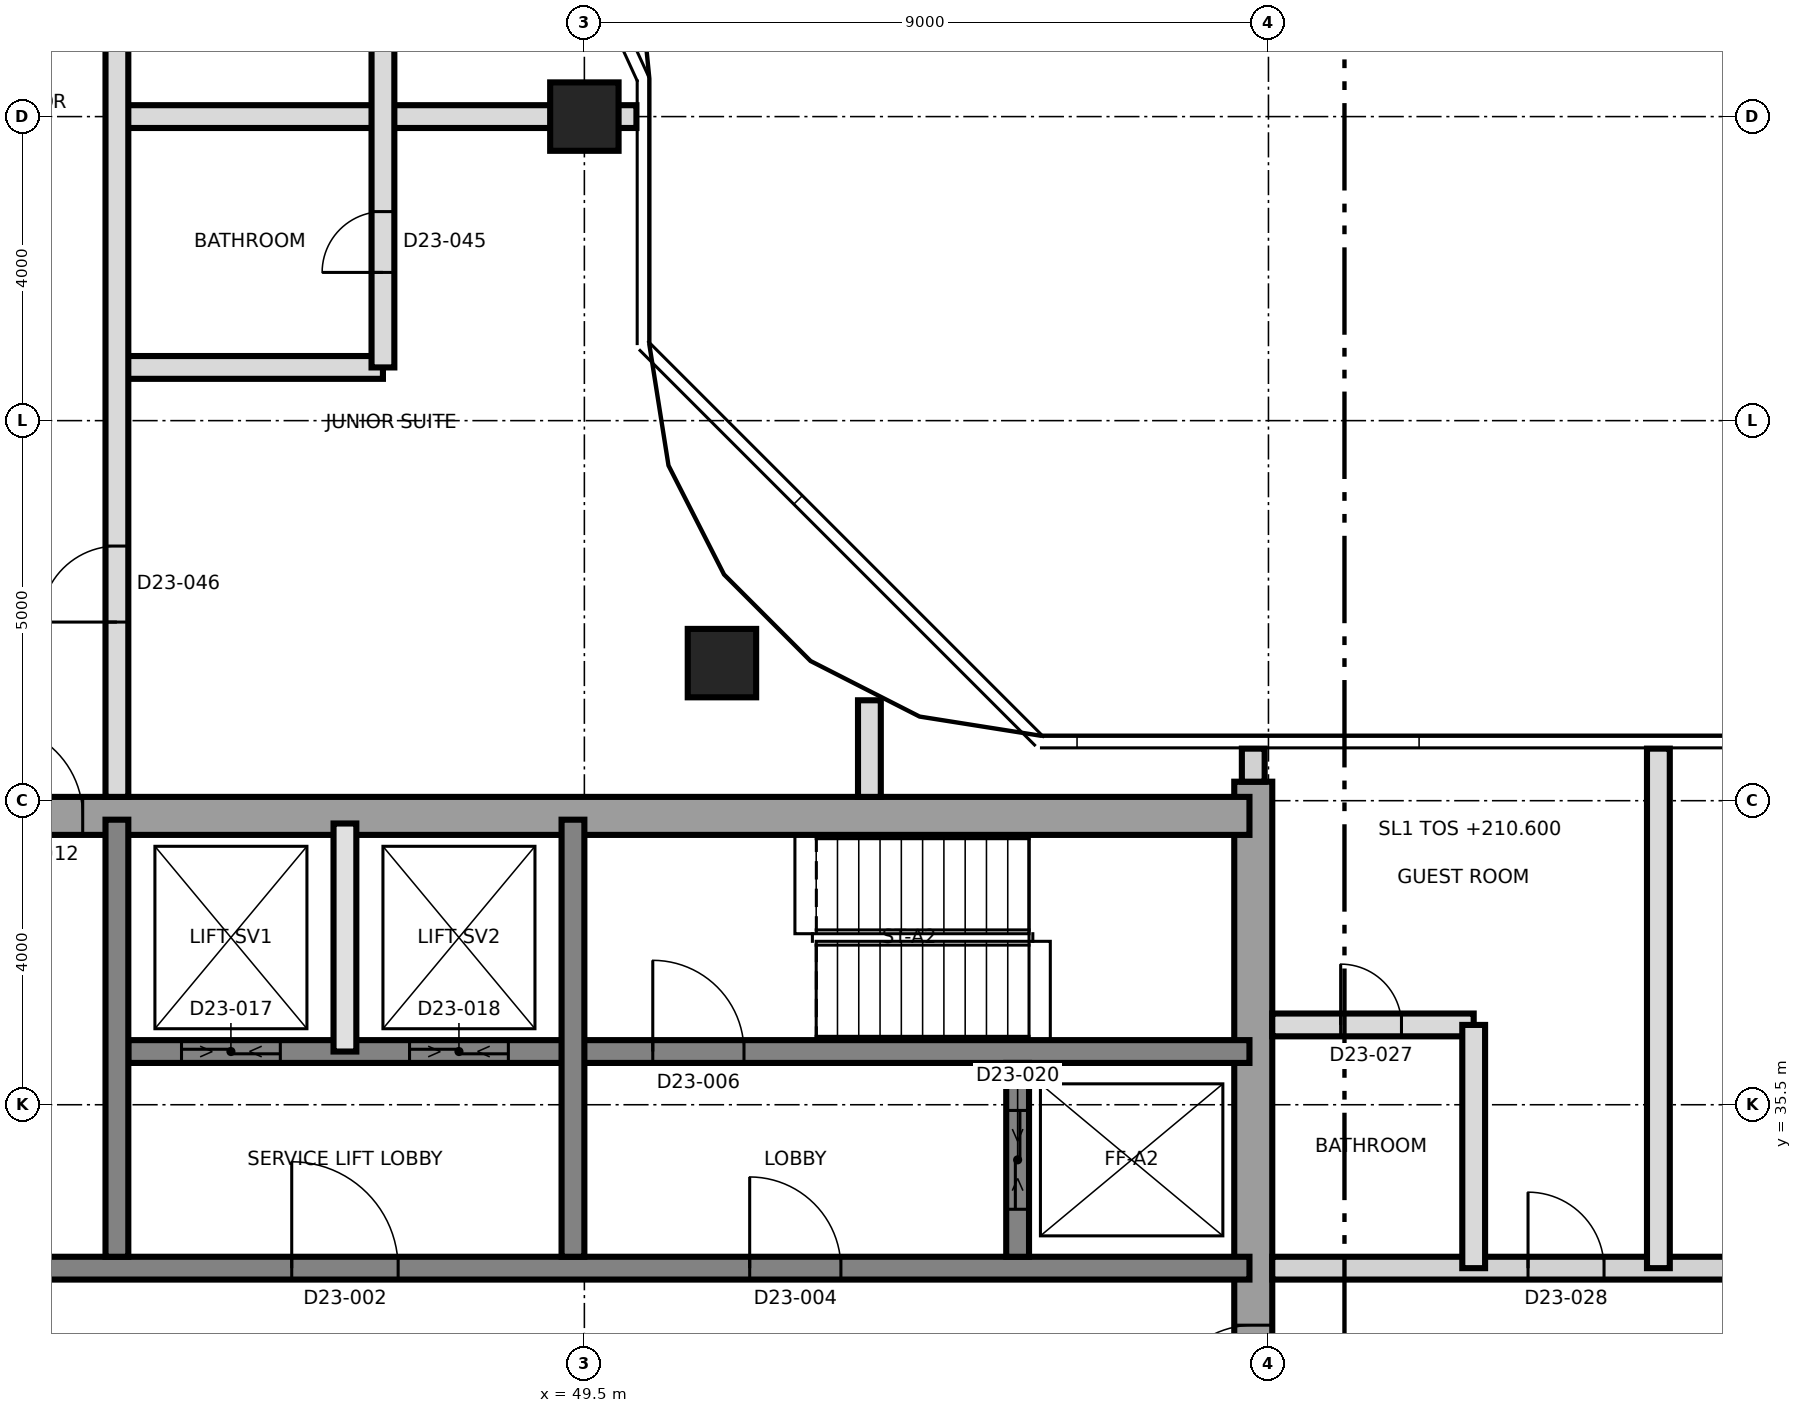
"""IFC4 building model, lengths in metres.
Left out: names, types, materials, properties, quantities, classifications, styles, units other than length and angle.
Written with IfcOpenShell. Run it as: python <this file> out.ifc"""

import sys

from ifc_helpers import new_model, si_unit, direction, frame, frame_2d, origin, origin_2d, place, context, subcontext, project, spatial, rectangle, extrude, element, fill, save


model = new_model("IFC4")
c1 = context("Model", 3, precision=1e-05, world=origin(), true_north=direction((0.0, 1.0)))
c2 = subcontext(c1, "Body", "Model", "MODEL_VIEW")
j1 = project(units=[si_unit("LENGTHUNIT", "METRE"), si_unit("PLANEANGLEUNIT", "RADIAN")], contexts=[c1])
p1 = place(None, origin())
s1 = spatial("IfcSite", under=j1, at=p1, CompositionType="ELEMENT")
p2 = place(p1, origin())
s2 = spatial("IfcBuilding", under=s1, at=p2, CompositionType="ELEMENT")
p3 = place(p2, frame((0.0, 0.0, 210.6)))
s3 = spatial("IfcBuildingStorey", under=s2, at=p3, CompositionType="ELEMENT", Elevation=210.6)
p4 = place(p3, frame((58.3, 21.25, 0.0), z_axis=(0.0, 0.0, 1.0), x_axis=(0.0, 1.0, 0.0)))
e1 = element("IfcWall", 1, at=p4, inside=s3, PredefinedType="SHEAR", context=c2, shape_type="SweptSolid", body=[
    extrude(rectangle(XDim=18.5, YDim=0.5, at=frame_2d((9.25, 0.0))), origin(), (0.0, 0.0, 1.0), 3.7),
])
p5 = place(p4, frame((10.15, 0.0, 0.0)))
e2 = element("IfcOpeningElement", 2, at=p5, cuts=e1, PredefinedType="OPENING", context=c2, shape_type="SweptSolid", body=[
    extrude(rectangle(XDim=1.2, YDim=2.1, at=frame_2d((0.6, 1.05))), frame((0.0, 0.26, 0.0), z_axis=(0.0, -1.0, 0.0), x_axis=(1.0, 0.0, 0.0)), (0.0, 0.0, 1.0), 0.52),
])
p6 = place(p3, frame((31.25, 39.3, 0.0), z_axis=(0.0, 0.0, 1.0), x_axis=(1.0, 0.0, 0.0)))
e3 = element("IfcWall", 3, at=p6, inside=s3, PredefinedType="SHEAR", context=c2, shape_type="SweptSolid", body=[
    extrude(rectangle(XDim=27.0, YDim=0.5, at=frame_2d((13.5, 0.0))), origin(), (0.0, 0.0, 1.0), 3.7),
])
p7 = place(p6, frame((10.45, 0.0, 0.0)))
e4 = element("IfcOpeningElement", 4, at=p7, cuts=e3, PredefinedType="OPENING", context=c2, shape_type="SweptSolid", body=[
    extrude(rectangle(XDim=1.2, YDim=2.1, at=frame_2d((0.6, 1.05))), frame((0.0, 0.26, 0.0), z_axis=(0.0, -1.0, 0.0), x_axis=(1.0, 0.0, 0.0)), (0.0, 0.0, 1.0), 0.52),
])
p8 = place(p3, frame((31.75, 33.35, 0.0), z_axis=(0.0, 0.0, 1.0), x_axis=(1.0, 0.0, 0.0)))
e5 = element("IfcWall", 5, at=p8, inside=s3, PredefinedType="SHEAR", context=c2, shape_type="SweptSolid", body=[
    extrude(rectangle(XDim=26.5, YDim=0.3, at=frame_2d((13.25, 0.0))), origin(), (0.0, 0.0, 1.0), 3.7),
])
p9 = place(p8, frame((13.9, 0.0, 0.0)))
e6 = element("IfcOpeningElement", 6, at=p9, cuts=e5, PredefinedType="OPENING", context=c2, shape_type="SweptSolid", body=[
    extrude(rectangle(XDim=1.4, YDim=2.1, at=frame_2d((0.7, 1.05))), frame((0.0, 0.16, 0.0), z_axis=(0.0, -1.0, 0.0), x_axis=(1.0, 0.0, 0.0)), (0.0, 0.0, 1.0), 0.32),
])
p10 = place(p8, frame((5.375, 0.0, 0.0)))
e7 = element("IfcOpeningElement", 7, at=p10, cuts=e5, PredefinedType="OPENING", context=c2, shape_type="SweptSolid", body=[
    extrude(rectangle(XDim=1.2, YDim=2.1, at=frame_2d((0.6, 1.05))), frame((0.0, 0.16, 0.0), z_axis=(0.0, -1.0, 0.0), x_axis=(1.0, 0.0, 0.0)), (0.0, 0.0, 1.0), 0.32),
])
p11 = place(p8, frame((19.925, 0.0, 0.0)))
e8 = element("IfcOpeningElement", 8, at=p11, cuts=e5, PredefinedType="OPENING", context=c2, shape_type="SweptSolid", body=[
    extrude(rectangle(XDim=1.2, YDim=2.1, at=frame_2d((0.6, 1.05))), frame((0.0, 0.16, 0.0), z_axis=(0.0, -1.0, 0.0), x_axis=(1.0, 0.0, 0.0)), (0.0, 0.0, 1.0), 0.32),
])
p12 = place(p3, frame((43.5, 36.2, 0.0), z_axis=(0.0, 0.0, 1.0), x_axis=(1.0, 0.0, 0.0)))
e9 = element("IfcWall", 9, at=p12, inside=s3, PredefinedType="SHEAR", context=c2, shape_type="SweptSolid", body=[
    extrude(rectangle(XDim=14.75, YDim=0.3, at=frame_2d((7.375, 0.0))), origin(), (0.0, 0.0, 1.0), 3.7),
])
p13 = place(p12, frame((6.9, 0.0, 0.0)))
e10 = element("IfcOpeningElement", 10, at=p13, cuts=e9, PredefinedType="OPENING", context=c2, shape_type="SweptSolid", body=[
    extrude(rectangle(XDim=1.2, YDim=2.1, at=frame_2d((0.6, 1.05))), frame((0.0, 0.16, 0.0), z_axis=(0.0, -1.0, 0.0), x_axis=(1.0, 0.0, 0.0)), (0.0, 0.0, 1.0), 0.32),
])
p14 = place(p12, frame((0.7, 0.0, 0.0)))
e11 = element("IfcOpeningElement", 11, at=p14, cuts=e9, PredefinedType="OPENING", context=c2, shape_type="SweptSolid", body=[
    extrude(rectangle(XDim=1.3, YDim=2.4, at=frame_2d((0.65, 1.2))), frame((0.0, 0.16, 0.0), z_axis=(0.0, -1.0, 0.0), x_axis=(1.0, 0.0, 0.0)), (0.0, 0.0, 1.0), 0.32),
])
p15 = place(p12, frame((3.7, 0.0, 0.0)))
e12 = element("IfcOpeningElement", 12, at=p15, cuts=e9, PredefinedType="OPENING", context=c2, shape_type="SweptSolid", body=[
    extrude(rectangle(XDim=1.3, YDim=2.4, at=frame_2d((0.65, 1.2))), frame((0.0, 0.16, 0.0), z_axis=(0.0, -1.0, 0.0), x_axis=(1.0, 0.0, 0.0)), (0.0, 0.0, 1.0), 0.32),
])
for number, where, z_axis, x_axis in (
    (13, (43.35, 33.5, 0.0), (0.0, 0.0, 1.0), (0.0, 1.0, 0.0)),
    (14, (49.35, 33.5, 0.0), (0.0, 0.0, 1.0), (0.0, 1.0, 0.0)),
):
    element("IfcWall", number, at=place(p3, frame(where, z_axis=z_axis, x_axis=x_axis)), inside=s3, PredefinedType="SHEAR", context=c2, shape_type="SweptSolid", body=[
        extrude(rectangle(XDim=5.75, YDim=0.3, at=frame_2d((2.875, 0.0))), origin(), (0.0, 0.0, 1.0), 3.7),
    ])
p16 = place(p3, frame((55.2, 33.5, 0.0), z_axis=(0.0, 0.0, 1.0), x_axis=(0.0, 1.0, 0.0)))
e15 = element("IfcWall", 15, at=p16, inside=s3, PredefinedType="SHEAR", context=c2, shape_type="SweptSolid", body=[
    extrude(rectangle(XDim=2.55, YDim=0.3, at=frame_2d((1.275, 0.0))), origin(), (0.0, 0.0, 1.0), 3.7),
])
p17 = place(p16, frame((0.625, 0.0, 0.0)))
e16 = element("IfcOpeningElement", 16, at=p17, cuts=e15, PredefinedType="OPENING", context=c2, shape_type="SweptSolid", body=[
    extrude(rectangle(XDim=1.3, YDim=2.4, at=frame_2d((0.65, 1.2))), frame((0.0, 0.16, 0.0), z_axis=(0.0, -1.0, 0.0), x_axis=(1.0, 0.0, 0.0)), (0.0, 0.0, 1.0), 0.32),
])
for number, where, z_axis, x_axis in (
    (17, (51.31, 41.31, 0.0), (0.0, 0.0, 1.0), (1.0, 0.0, 0.0)),
    (18, (49.5, 48.5, 0.0), (0.0, 0.0, 1.0), (1.0, 0.0, 0.0)),
):
    element("IfcColumn", number, at=place(p3, frame(where, z_axis=z_axis, x_axis=x_axis)), inside=s3, PredefinedType="COLUMN", context=c2, shape_type="SweptSolid", body=[
        extrude(rectangle(XDim=0.9, YDim=0.9, at=origin_2d()), origin(), (0.0, 0.0, 1.0), 3.7),
    ])
p18 = place(p3, frame((46.35, 36.2, 0.0), z_axis=(0.0, 0.0, 1.0), x_axis=(0.0, 1.0, 0.0)))
e19 = element("IfcWall", 19, at=p18, inside=s3, PredefinedType="SOLIDWALL", context=c2, shape_type="SweptSolid", body=[
    extrude(rectangle(XDim=3.0, YDim=0.3, at=frame_2d((1.5, 0.0))), origin(), (0.0, 0.0, 1.0), 3.4),
])
p19 = place(p3, frame((58.55, 33.35, 0.0), z_axis=(0.0, 0.0, 1.0), x_axis=(1.0, 0.0, 0.0)))
e20 = element("IfcWall", 20, at=p19, inside=s3, PredefinedType="PARTITIONING", context=c2, shape_type="SweptSolid", body=[
    extrude(rectangle(XDim=26.78, YDim=0.3, at=frame_2d((13.39, 0.0))), origin(), (0.0, 0.0, 1.0), 3.4),
])
p20 = place(p19, frame((3.365, 0.0, 0.0)))
e21 = element("IfcOpeningElement", 21, at=p20, cuts=e20, PredefinedType="OPENING", context=c2, shape_type="SweptSolid", body=[
    extrude(rectangle(XDim=1.0, YDim=2.1, at=frame_2d((0.5, 1.05))), frame((0.0, 0.16, 0.0), z_axis=(0.0, -1.0, 0.0), x_axis=(1.0, 0.0, 0.0)), (0.0, 0.0, 1.0), 0.32),
])
p21 = place(p19, frame((6.315, 0.0, 0.0)))
e22 = element("IfcOpeningElement", 22, at=p21, cuts=e20, PredefinedType="OPENING", context=c2, shape_type="SweptSolid", body=[
    extrude(rectangle(XDim=1.4, YDim=2.1, at=frame_2d((0.7, 1.05))), frame((0.0, 0.16, 0.0), z_axis=(0.0, -1.0, 0.0), x_axis=(1.0, 0.0, 0.0)), (0.0, 0.0, 1.0), 0.32),
])
p22 = place(p19, frame((10.65, 0.0, 0.0)))
e23 = element("IfcOpeningElement", 23, at=p22, cuts=e20, PredefinedType="OPENING", context=c2, shape_type="SweptSolid", body=[
    extrude(rectangle(XDim=1.2, YDim=2.1, at=frame_2d((0.6, 1.05))), frame((0.0, 0.16, 0.0), z_axis=(0.0, -1.0, 0.0), x_axis=(1.0, 0.0, 0.0)), (0.0, 0.0, 1.0), 0.32),
])
p23 = place(p19, frame((13.9, 0.0, 0.0)))
e24 = element("IfcOpeningElement", 24, at=p23, cuts=e20, PredefinedType="OPENING", context=c2, shape_type="SweptSolid", body=[
    extrude(rectangle(XDim=1.0, YDim=2.1, at=frame_2d((0.5, 1.05))), frame((0.0, 0.16, 0.0), z_axis=(0.0, -1.0, 0.0), x_axis=(1.0, 0.0, 0.0)), (0.0, 0.0, 1.0), 0.32),
])
p24 = place(p19, frame((19.085, 0.0, 0.0)))
e25 = element("IfcOpeningElement", 25, at=p24, cuts=e20, PredefinedType="OPENING", context=c2, shape_type="SweptSolid", body=[
    extrude(rectangle(XDim=1.2, YDim=2.1, at=frame_2d((0.6, 1.05))), frame((0.0, 0.16, 0.0), z_axis=(0.0, -1.0, 0.0), x_axis=(1.0, 0.0, 0.0)), (0.0, 0.0, 1.0), 0.32),
])
p25 = place(p19, frame((22.335, 0.0, 0.0)))
e26 = element("IfcOpeningElement", 26, at=p25, cuts=e20, PredefinedType="OPENING", context=c2, shape_type="SweptSolid", body=[
    extrude(rectangle(XDim=1.0, YDim=2.1, at=frame_2d((0.5, 1.05))), frame((0.0, 0.16, 0.0), z_axis=(0.0, -1.0, 0.0), x_axis=(1.0, 0.0, 0.0)), (0.0, 0.0, 1.0), 0.32),
])
p26 = place(p3, frame((58.55, 36.55, 0.0), z_axis=(0.0, 0.0, 1.0), x_axis=(1.0, 0.0, 0.0)))
e27 = element("IfcWall", 27, at=p26, inside=s3, PredefinedType="PARTITIONING", context=c2, shape_type="SweptSolid", body=[
    extrude(rectangle(XDim=2.65, YDim=0.3, at=frame_2d((1.325, 0.0))), origin(), (0.0, 0.0, 1.0), 3.4),
])
p27 = place(p26, frame((0.9, 0.0, 0.0)))
e28 = element("IfcOpeningElement", 28, at=p27, cuts=e27, PredefinedType="OPENING", context=c2, shape_type="SweptSolid", body=[
    extrude(rectangle(XDim=0.8, YDim=2.1, at=frame_2d((0.4, 1.05))), frame((0.0, 0.16, 0.0), z_axis=(0.0, -1.0, 0.0), x_axis=(1.0, 0.0, 0.0)), (0.0, 0.0, 1.0), 0.32),
])
p28 = place(p3, frame((43.35, 45.2, 0.0), z_axis=(0.0, 0.0, 1.0), x_axis=(1.0, 0.0, 0.0)))
e29 = element("IfcWall", 29, at=p28, inside=s3, PredefinedType="PARTITIONING", context=c2, shape_type="SweptSolid", body=[
    extrude(rectangle(XDim=3.5, YDim=0.3, at=frame_2d((1.75, 0.0))), origin(), (0.0, 0.0, 1.0), 3.4),
])
p29 = place(p3, frame((43.35, 48.5, 0.0), z_axis=(0.0, 0.0, 1.0), x_axis=(1.0, 0.0, 0.0)))
e30 = element("IfcWall", 30, at=p29, inside=s3, PredefinedType="PARTITIONING", context=c2, shape_type="SweptSolid", body=[
    extrude(rectangle(XDim=6.835, YDim=0.3, at=frame_2d((3.417, 0.0))), origin(), (0.0, 0.0, 1.0), 3.35),
])
p30 = place(p3, frame((43.35, 39.55, 0.0), z_axis=(0.0, 0.0, 1.0), x_axis=(0.0, 1.0, 0.0)))
e31 = element("IfcWall", 31, at=p30, inside=s3, PredefinedType="PARTITIONING", context=c2, shape_type="SweptSolid", body=[
    extrude(rectangle(XDim=18.352, YDim=0.3, at=frame_2d((9.176, 0.0))), origin(), (0.0, 0.0, 1.0), 3.35),
])
p31 = place(p30, frame((2.3, 0.0, 0.0)))
e32 = element("IfcOpeningElement", 32, at=p31, cuts=e31, PredefinedType="OPENING", context=c2, shape_type="SweptSolid", body=[
    extrude(rectangle(XDim=1.0, YDim=2.4, at=frame_2d((0.5, 1.2))), frame((0.0, 0.16, 0.0), z_axis=(0.0, -1.0, 0.0), x_axis=(1.0, 0.0, 0.0)), (0.0, 0.0, 1.0), 0.32),
])
p32 = place(p30, frame((14.6, 0.0, 0.0)))
e33 = element("IfcOpeningElement", 33, at=p32, cuts=e31, PredefinedType="OPENING", context=c2, shape_type="SweptSolid", body=[
    extrude(rectangle(XDim=1.0, YDim=2.4, at=frame_2d((0.5, 1.2))), frame((0.0, 0.16, 0.0), z_axis=(0.0, -1.0, 0.0), x_axis=(1.0, 0.0, 0.0)), (0.0, 0.0, 1.0), 0.32),
])
p33 = place(p3, frame((46.85, 45.2, 0.0), z_axis=(0.0, 0.0, 1.0), x_axis=(0.0, 1.0, 0.0)))
e34 = element("IfcWall", 34, at=p33, inside=s3, PredefinedType="PARTITIONING", context=c2, shape_type="SweptSolid", body=[
    extrude(rectangle(XDim=6.6, YDim=0.3, at=frame_2d((3.3, 0.0))), origin(), (0.0, 0.0, 1.0), 3.4),
])
p34 = place(p33, frame((1.25, 0.0, 0.0)))
e35 = element("IfcOpeningElement", 35, at=p34, cuts=e34, PredefinedType="OPENING", context=c2, shape_type="SweptSolid", body=[
    extrude(rectangle(XDim=0.8, YDim=2.1, at=frame_2d((0.4, 1.05))), frame((0.0, 0.16, 0.0), z_axis=(0.0, -1.0, 0.0), x_axis=(1.0, 0.0, 0.0)), (0.0, 0.0, 1.0), 0.32),
])
p35 = place(p33, frame((4.55, 0.0, 0.0)))
e36 = element("IfcOpeningElement", 36, at=p35, cuts=e34, PredefinedType="OPENING", context=c2, shape_type="SweptSolid", body=[
    extrude(rectangle(XDim=0.8, YDim=2.1, at=frame_2d((0.4, 1.05))), frame((0.0, 0.16, 0.0), z_axis=(0.0, -1.0, 0.0), x_axis=(1.0, 0.0, 0.0)), (0.0, 0.0, 1.0), 0.32),
])
p36 = place(p3, frame((53.25, 39.55, 0.0), z_axis=(0.0, 0.0, 1.0), x_axis=(0.0, 1.0, 0.0)))
e37 = element("IfcWall", 37, at=p36, inside=s3, PredefinedType="PARTITIONING", context=c2, shape_type="SweptSolid", body=[
    extrude(rectangle(XDim=1.271, YDim=0.3, at=frame_2d((0.635, 0.0))), origin(), (0.0, 0.0, 1.0), 3.35),
])
p37 = place(p3, frame((61.2, 33.35, 0.0), z_axis=(0.0, 0.0, 1.0), x_axis=(0.0, 1.0, 0.0)))
e38 = element("IfcWall", 38, at=p37, inside=s3, PredefinedType="PARTITIONING", context=c2, shape_type="SweptSolid", body=[
    extrude(rectangle(XDim=3.2, YDim=0.3, at=frame_2d((1.6, 0.0))), origin(), (0.0, 0.0, 1.0), 3.4),
])
p38 = place(p3, frame((63.63, 33.35, 0.0), z_axis=(0.0, 0.0, 1.0), x_axis=(0.0, 1.0, 0.0)))
e39 = element("IfcWall", 39, at=p38, inside=s3, PredefinedType="PARTITIONING", context=c2, shape_type="SweptSolid", body=[
    extrude(rectangle(XDim=6.835, YDim=0.3, at=frame_2d((3.417, 0.0))), origin(), (0.0, 0.0, 1.0), 3.35),
])
p39 = place(p3, frame((58.3, 39.75, 0.0), z_axis=(0.0, 0.0, 1.0), x_axis=(0.0, 1.0, 0.0)))
e40 = element("IfcWall", 40, at=p39, inside=s3, PredefinedType="PARTITIONING", context=c2, shape_type="SweptSolid", body=[
    extrude(rectangle(XDim=0.435, YDim=0.3, at=frame_2d((0.218, 0.0))), origin(), (0.0, 0.0, 1.0), 3.4),
])
p40 = place(p9, origin())
e41 = element("IfcDoor", 41, at=p40, inside=s3, OperationType="SINGLE_SWING_RIGHT", PredefinedType="DOOR", context=c2, shape_type="SweptSolid", body=[
    extrude(rectangle(XDim=1.4, YDim=2.1, at=frame_2d((0.7, 1.05))), frame((0.0, 0.025, 0.0), z_axis=(0.0, -1.0, 0.0), x_axis=(1.0, 0.0, 0.0)), (0.0, 0.0, 1.0), 0.05),
])
fill(e6, e41)
p41 = place(p11, origin())
e42 = element("IfcDoor", 42, at=p41, inside=s3, OperationType="SINGLE_SWING_RIGHT", PredefinedType="DOOR", context=c2, shape_type="SweptSolid", body=[
    extrude(rectangle(XDim=1.2, YDim=2.1, at=frame_2d((0.6, 1.05))), frame((0.0, 0.025, 0.0), z_axis=(0.0, -1.0, 0.0), x_axis=(1.0, 0.0, 0.0)), (0.0, 0.0, 1.0), 0.05),
])
fill(e8, e42)
p42 = place(p13, origin())
e43 = element("IfcDoor", 43, at=p42, inside=s3, OperationType="SINGLE_SWING_LEFT", PredefinedType="DOOR", context=c2, shape_type="SweptSolid", body=[
    extrude(rectangle(XDim=1.2, YDim=2.1, at=frame_2d((0.6, 1.05))), frame((0.0, 0.025, 0.0), z_axis=(0.0, -1.0, 0.0), x_axis=(1.0, 0.0, 0.0)), (0.0, 0.0, 1.0), 0.05),
])
fill(e10, e43)
p43 = place(p5, origin())
e44 = element("IfcDoor", 44, at=p43, inside=s3, OperationType="SINGLE_SWING_LEFT", PredefinedType="DOOR", context=c2, shape_type="SweptSolid", body=[
    extrude(rectangle(XDim=1.2, YDim=2.1, at=frame_2d((0.6, 1.05))), frame((0.0, 0.025, 0.0), z_axis=(0.0, -1.0, 0.0), x_axis=(1.0, 0.0, 0.0)), (0.0, 0.0, 1.0), 0.05),
])
fill(e2, e44)
p44 = place(p7, origin())
e45 = element("IfcDoor", 45, at=p44, inside=s3, OperationType="SINGLE_SWING_RIGHT", PredefinedType="DOOR", context=c2, shape_type="SweptSolid", body=[
    extrude(rectangle(XDim=1.2, YDim=2.1, at=frame_2d((0.6, 1.05))), frame((0.0, 0.025, 0.0), z_axis=(0.0, -1.0, 0.0), x_axis=(1.0, 0.0, 0.0)), (0.0, 0.0, 1.0), 0.05),
])
fill(e4, e45)
p45 = place(p14, origin())
e46 = element("IfcDoor", 46, at=p45, inside=s3, OperationType="SLIDING_TO_LEFT", PredefinedType="DOOR", context=c2, shape_type="SweptSolid", body=[
    extrude(rectangle(XDim=1.3, YDim=2.4, at=frame_2d((0.65, 1.2))), frame((0.0, 0.025, 0.0), z_axis=(0.0, -1.0, 0.0), x_axis=(1.0, 0.0, 0.0)), (0.0, 0.0, 1.0), 0.05),
])
fill(e11, e46)
p46 = place(p15, origin())
e47 = element("IfcDoor", 47, at=p46, inside=s3, OperationType="SLIDING_TO_LEFT", PredefinedType="DOOR", context=c2, shape_type="SweptSolid", body=[
    extrude(rectangle(XDim=1.3, YDim=2.4, at=frame_2d((0.65, 1.2))), frame((0.0, 0.025, 0.0), z_axis=(0.0, -1.0, 0.0), x_axis=(1.0, 0.0, 0.0)), (0.0, 0.0, 1.0), 0.05),
])
fill(e12, e47)
p47 = place(p17, origin())
e48 = element("IfcDoor", 48, at=p47, inside=s3, OperationType="SLIDING_TO_LEFT", PredefinedType="DOOR", context=c2, shape_type="SweptSolid", body=[
    extrude(rectangle(XDim=1.3, YDim=2.4, at=frame_2d((0.65, 1.2))), frame((0.0, 0.025, 0.0), z_axis=(0.0, -1.0, 0.0), x_axis=(1.0, 0.0, 0.0)), (0.0, 0.0, 1.0), 0.05),
])
fill(e16, e48)
p48 = place(p27, origin())
e49 = element("IfcDoor", 49, at=p48, inside=s3, OperationType="SINGLE_SWING_LEFT", PredefinedType="DOOR", context=c2, shape_type="SweptSolid", body=[
    extrude(rectangle(XDim=0.8, YDim=2.1, at=frame_2d((0.4, 1.05))), frame((0.0, 0.025, 0.0), z_axis=(0.0, -1.0, 0.0), x_axis=(1.0, 0.0, 0.0)), (0.0, 0.0, 1.0), 0.05),
])
fill(e28, e49)
p49 = place(p20, origin())
e50 = element("IfcDoor", 50, at=p49, inside=s3, OperationType="SINGLE_SWING_LEFT", PredefinedType="DOOR", context=c2, shape_type="SweptSolid", body=[
    extrude(rectangle(XDim=1.0, YDim=2.1, at=frame_2d((0.5, 1.05))), frame((0.0, 0.025, 0.0), z_axis=(0.0, -1.0, 0.0), x_axis=(1.0, 0.0, 0.0)), (0.0, 0.0, 1.0), 0.05),
])
fill(e21, e50)
p50 = place(p34, origin())
e51 = element("IfcDoor", 51, at=p50, inside=s3, OperationType="SINGLE_SWING_LEFT", PredefinedType="DOOR", context=c2, shape_type="SweptSolid", body=[
    extrude(rectangle(XDim=0.8, YDim=2.1, at=frame_2d((0.4, 1.05))), frame((0.0, 0.025, 0.0), z_axis=(0.0, -1.0, 0.0), x_axis=(1.0, 0.0, 0.0)), (0.0, 0.0, 1.0), 0.05),
])
fill(e35, e51)
p51 = place(p31, origin())
e52 = element("IfcDoor", 52, at=p51, inside=s3, OperationType="SINGLE_SWING_LEFT", PredefinedType="DOOR", context=c2, shape_type="SweptSolid", body=[
    extrude(rectangle(XDim=1.0, YDim=2.4, at=frame_2d((0.5, 1.2))), frame((0.0, 0.025, 0.0), z_axis=(0.0, -1.0, 0.0), x_axis=(1.0, 0.0, 0.0)), (0.0, 0.0, 1.0), 0.05),
])
fill(e32, e52)
save(model, sys.argv[1])
